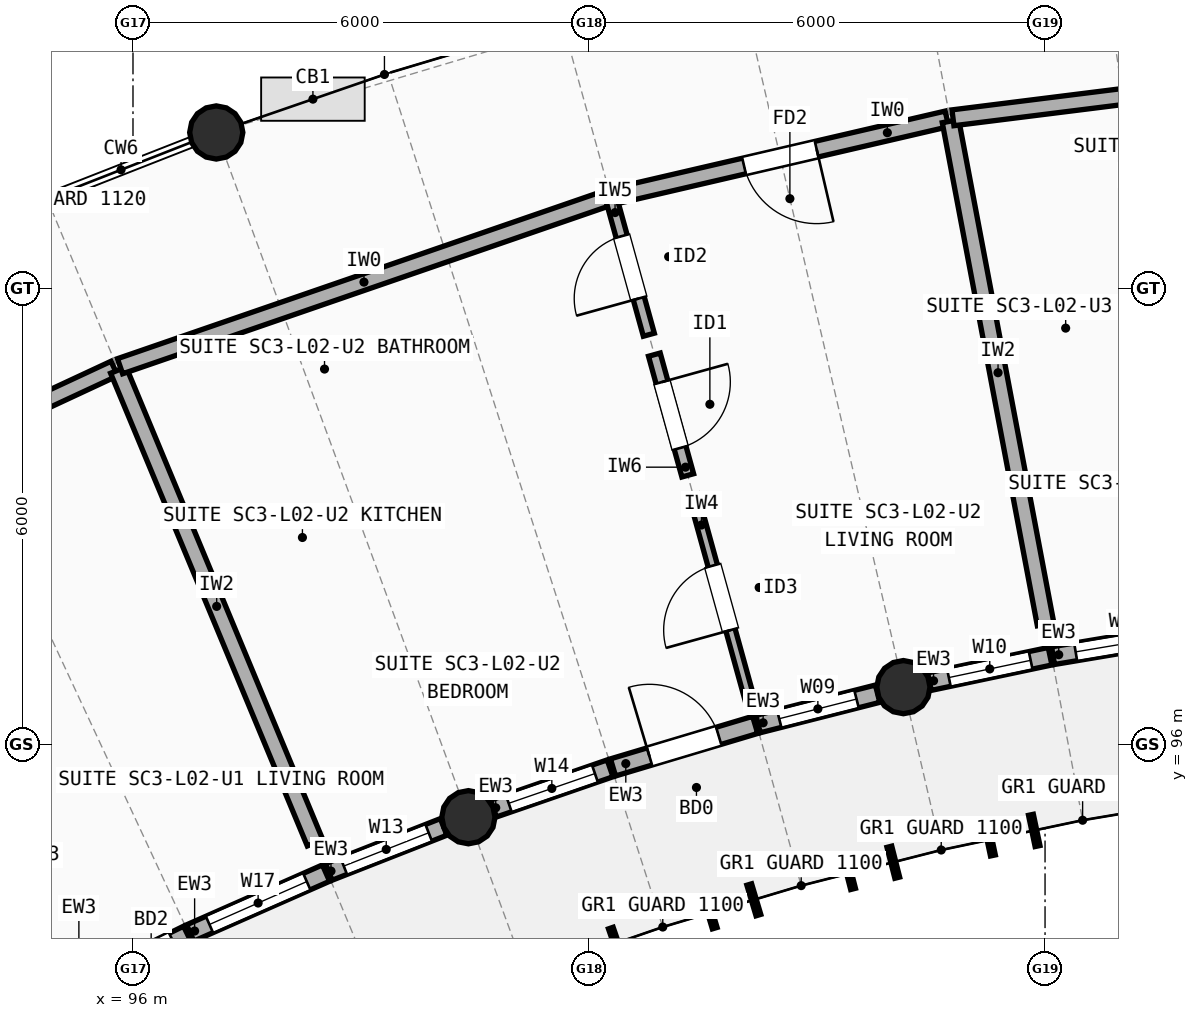
"""IFC4 building model, lengths in metres.
Left out: names, types, materials, properties, quantities, classifications, styles, units other than length and angle.
Written with IfcOpenShell. Run it as: python <this file> out.ifc"""

import sys

from ifc_helpers import new_model, si_unit, direction, frame, frame_2d, origin, origin_2d, place, context, subcontext, project, spatial, rectangle, circle, extrude, element, fill, save


model = new_model("IFC4")
c1 = context("Model", 3, precision=1e-05, world=origin(), true_north=direction((0.0, 1.0)))
c2 = subcontext(c1, "Body", "Model", "MODEL_VIEW")
j1 = project(units=[si_unit("LENGTHUNIT", "METRE"), si_unit("PLANEANGLEUNIT", "RADIAN")], contexts=[c1])
p1 = place(None, origin())
s1 = spatial("IfcSite", under=j1, at=p1, CompositionType="ELEMENT")
p2 = place(p1, origin())
s2 = spatial("IfcBuilding", under=s1, at=p2, CompositionType="ELEMENT")
p3 = place(p2, frame((0.0, 0.0, 7.7)))
s3 = spatial("IfcBuildingStorey", under=s2, at=p3, CompositionType="ELEMENT", Elevation=7.7)
for number, where, z_axis, x_axis in (
    (1, (100.413, 95.043, 0.0), (0.0, 0.0, 1.0), (1.0, 0.0, 0.0)),
    (2, (97.095, 104.052, 0.0), (0.0, 0.0, 1.0), (1.0, 0.0, 0.0)),
    (3, (106.136, 96.754, 0.0), (0.0, 0.0, 1.0), (1.0, 0.0, 0.0)),
):
    element("IfcColumn", number, at=place(p3, frame(where, z_axis=z_axis, x_axis=x_axis)), inside=s3, PredefinedType="COLUMN", context=c2, shape_type="SweptSolid", body=[
        extrude(circle(Radius=0.35, at=origin_2d()), origin(), (0.0, 0.0, 1.0), 2.948),
    ])
p4 = place(p3, frame((95.261, 92.788, 0.0), z_axis=(0.0, 0.0, 1.0), x_axis=(0.897535518759, 0.440942164649, 0.0)))
e4 = element("IfcWall", 4, at=p4, inside=s3, PredefinedType="STANDARD", context=c2, shape_type="SweptSolid", body=[
    extrude(rectangle(XDim=1.622, YDim=0.235, at=frame_2d((0.811, 0.0))), origin(), (0.0, 0.0, 1.0), 2.684),
])
p5 = place(p4, frame((0.211, 0.0, 0.0)))
e5 = element("IfcOpeningElement", 5, at=p5, cuts=e4, PredefinedType="OPENING", context=c2, shape_type="SweptSolid", body=[
    extrude(rectangle(XDim=1.2, YDim=2.15, at=frame_2d((0.6, 1.075))), frame((0.0, 0.127, 0.0), z_axis=(0.0, -1.0, 0.0), x_axis=(1.0, 0.0, 0.0)), (0.0, 0.0, 1.0), 0.255),
])
p6 = place(p3, frame((96.753, 93.521, 0.0), z_axis=(0.0, 0.0, 1.0), x_axis=(0.915126852478, 0.403166025197, 0.0)))
e6 = element("IfcWall", 6, at=p6, inside=s3, PredefinedType="STANDARD", context=c2, shape_type="SweptSolid", body=[
    extrude(rectangle(XDim=1.952, YDim=0.235, at=frame_2d((0.976, 0.0))), origin(), (0.0, 0.0, 1.0), 2.684),
])
p7 = place(p6, frame((0.276, 0.0, 0.85)))
e7 = element("IfcOpeningElement", 7, at=p7, cuts=e6, PredefinedType="OPENING", context=c2, shape_type="SweptSolid", body=[
    extrude(rectangle(XDim=1.4, YDim=1.5, at=frame_2d((0.7, 0.75))), frame((0.0, 0.127, 0.0), z_axis=(0.0, -1.0, 0.0), x_axis=(1.0, 0.0, 0.0)), (0.0, 0.0, 1.0), 0.255),
])
p8 = place(p3, frame((98.577, 94.323, 0.0), z_axis=(0.0, 0.0, 1.0), x_axis=(0.930967180533, 0.365102874228, 0.0)))
e8 = element("IfcWall", 8, at=p8, inside=s3, PredefinedType="STANDARD", context=c2, shape_type="SweptSolid", body=[
    extrude(rectangle(XDim=1.622, YDim=0.235, at=frame_2d((0.811, 0.0))), origin(), (0.0, 0.0, 1.0), 2.684),
])
p9 = place(p8, frame((0.211, 0.0, 0.85)))
e9 = element("IfcOpeningElement", 9, at=p9, cuts=e8, PredefinedType="OPENING", context=c2, shape_type="SweptSolid", body=[
    extrude(rectangle(XDim=1.2, YDim=1.45, at=frame_2d((0.6, 0.725))), frame((0.0, 0.127, 0.0), z_axis=(0.0, -1.0, 0.0), x_axis=(1.0, 0.0, 0.0)), (0.0, 0.0, 1.0), 0.255),
])
p10 = place(p3, frame((100.744, 95.157, 0.0), z_axis=(0.0, 0.0, 1.0), x_axis=(0.945336194352, 0.32609734689, 0.0)))
e10 = element("IfcWall", 10, at=p10, inside=s3, PredefinedType="STANDARD", context=c2, shape_type="SweptSolid", body=[
    extrude(rectangle(XDim=1.622, YDim=0.235, at=frame_2d((0.811, 0.0))), origin(), (0.0, 0.0, 1.0), 2.684),
])
p11 = place(p10, frame((0.211, 0.0, 0.85)))
e11 = element("IfcOpeningElement", 11, at=p11, cuts=e10, PredefinedType="OPENING", context=c2, shape_type="SweptSolid", body=[
    extrude(rectangle(XDim=1.2, YDim=1.5, at=frame_2d((0.6, 0.75))), frame((0.0, 0.127, 0.0), z_axis=(0.0, -1.0, 0.0), x_axis=(1.0, 0.0, 0.0)), (0.0, 0.0, 1.0), 0.255),
])
p12 = place(p3, frame((102.316, 95.698, 0.0), z_axis=(0.0, 0.0, 1.0), x_axis=(0.95807718441, 0.286510224446, 0.0)))
e12 = element("IfcWall", 12, at=p12, inside=s3, PredefinedType="STANDARD", context=c2, shape_type="SweptSolid", body=[
    extrude(rectangle(XDim=1.952, YDim=0.235, at=frame_2d((0.976, 0.0))), origin(), (0.0, 0.0, 1.0), 2.684),
])
p13 = place(p12, frame((0.501, 0.0, 0.0)))
e13 = element("IfcOpeningElement", 13, at=p13, cuts=e12, PredefinedType="OPENING", context=c2, shape_type="SweptSolid", body=[
    extrude(rectangle(XDim=0.95, YDim=2.12, at=frame_2d((0.475, 1.06))), frame((0.0, 0.127, 0.0), z_axis=(0.0, -1.0, 0.0), x_axis=(1.0, 0.0, 0.0)), (0.0, 0.0, 1.0), 0.255),
])
p14 = place(p3, frame((104.225, 96.268, 0.0), z_axis=(0.0, 0.0, 1.0), x_axis=(0.969152085663, 0.246463455413, 0.0)))
e14 = element("IfcWall", 14, at=p14, inside=s3, PredefinedType="STANDARD", context=c2, shape_type="SweptSolid", body=[
    extrude(rectangle(XDim=1.623, YDim=0.235, at=frame_2d((0.811, 0.0))), origin(), (0.0, 0.0, 1.0), 2.684),
])
p15 = place(p14, frame((0.286, 0.0, 0.85)))
e15 = element("IfcOpeningElement", 15, at=p15, cuts=e14, PredefinedType="OPENING", context=c2, shape_type="SweptSolid", body=[
    extrude(rectangle(XDim=1.05, YDim=1.35, at=frame_2d((0.525, 0.675))), frame((0.0, 0.127, 0.0), z_axis=(0.0, -1.0, 0.0), x_axis=(1.0, 0.0, 0.0)), (0.0, 0.0, 1.0), 0.255),
])
p16 = place(p3, frame((106.479, 96.826, 0.0), z_axis=(0.0, 0.0, 1.0), x_axis=(0.978514642092, 0.206177339229, 0.0)))
e16 = element("IfcWall", 16, at=p16, inside=s3, PredefinedType="STANDARD", context=c2, shape_type="SweptSolid", body=[
    extrude(rectangle(XDim=1.622, YDim=0.235, at=frame_2d((0.811, 0.0))), origin(), (0.0, 0.0, 1.0), 2.684),
])
p17 = place(p16, frame((0.261, 0.0, 0.85)))
e17 = element("IfcOpeningElement", 17, at=p17, cuts=e16, PredefinedType="OPENING", context=c2, shape_type="SweptSolid", body=[
    extrude(rectangle(XDim=1.1, YDim=1.45, at=frame_2d((0.55, 0.725))), frame((0.0, 0.127, 0.0), z_axis=(0.0, -1.0, 0.0), x_axis=(1.0, 0.0, 0.0)), (0.0, 0.0, 1.0), 0.255),
])
p18 = place(p3, frame((108.105, 97.168, 0.0), z_axis=(0.0, 0.0, 1.0), x_axis=(0.986241418229, 0.165311418144, 0.0)))
e18 = element("IfcWall", 18, at=p18, inside=s3, PredefinedType="STANDARD", context=c2, shape_type="SweptSolid", body=[
    extrude(rectangle(XDim=1.952, YDim=0.235, at=frame_2d((0.976, 0.0))), origin(), (0.0, 0.0, 1.0), 2.684),
])
p19 = place(p18, frame((0.301, 0.0, 0.85)))
e19 = element("IfcOpeningElement", 19, at=p19, cuts=e18, PredefinedType="OPENING", context=c2, shape_type="SweptSolid", body=[
    extrude(rectangle(XDim=1.35, YDim=1.5, at=frame_2d((0.675, 0.75))), frame((0.0, 0.127, 0.0), z_axis=(0.0, -1.0, 0.0), x_axis=(1.0, 0.0, 0.0)), (0.0, 0.0, 1.0), 0.255),
])
p20 = place(p3, frame((91.675, 99.046, 0.0), z_axis=(0.0, 0.0, 1.0), x_axis=(0.906512639591, 0.422178675755, 0.0)))
e20 = element("IfcWall", 20, at=p20, inside=s3, PredefinedType="SOLIDWALL", context=c2, shape_type="SweptSolid", body=[
    extrude(rectangle(XDim=4.501, YDim=0.21, at=frame_2d((2.251, 0.0))), origin(), (0.0, 0.0, 1.0), 2.762),
])
p21 = place(p20, frame((1.751, 0.0, 0.0)))
e21 = element("IfcOpeningElement", 21, at=p21, cuts=e20, PredefinedType="OPENING", context=c2, shape_type="SweptSolid", body=[
    extrude(rectangle(XDim=1.0, YDim=2.15, at=frame_2d((0.5, 1.075))), frame((0.0, 0.115, 0.0), z_axis=(0.0, -1.0, 0.0), x_axis=(1.0, 0.0, 0.0)), (0.0, 0.0, 1.0), 0.23),
])
p22 = place(p3, frame((98.395, 94.707, 0.0), z_axis=(0.0, 0.0, 1.0), x_axis=(-0.384190705314, 0.923253758157, 0.0)))
e22 = element("IfcWall", 22, at=p22, inside=s3, PredefinedType="SOLIDWALL", context=c2, shape_type="SweptSolid", body=[
    extrude(rectangle(XDim=6.736, YDim=0.22, at=frame_2d((3.368, 0.0))), origin(), (0.0, 0.0, 1.0), 2.722),
])
p23 = place(p3, frame((95.83, 100.976, 0.0), z_axis=(0.0, 0.0, 1.0), x_axis=(0.945371453115, 0.325995115969, 0.0)))
e23 = element("IfcWall", 23, at=p23, inside=s3, PredefinedType="SOLIDWALL", context=c2, shape_type="SweptSolid", body=[
    extrude(rectangle(XDim=6.79, YDim=0.21, at=frame_2d((3.395, 0.0))), origin(), (0.0, 0.0, 1.0), 2.742),
])
p24 = place(p3, frame((102.325, 103.212, 0.0), z_axis=(0.0, 0.0, 1.0), x_axis=(0.974052809246, 0.226320844821, 0.0)))
e24 = element("IfcWall", 24, at=p24, inside=s3, PredefinedType="SOLIDWALL", context=c2, shape_type="SweptSolid", body=[
    extrude(rectangle(XDim=4.501, YDim=0.21, at=frame_2d((2.251, 0.0))), origin(), (0.0, 0.0, 1.0), 2.742),
])
p25 = place(p24, frame((1.761, 0.0, 0.0)))
e25 = element("IfcOpeningElement", 25, at=p25, cuts=e24, PredefinedType="OPENING", context=c2, shape_type="SweptSolid", body=[
    extrude(rectangle(XDim=0.98, YDim=2.15, at=frame_2d((0.49, 1.075))), frame((0.0, 0.115, 0.0), z_axis=(0.0, -1.0, 0.0), x_axis=(1.0, 0.0, 0.0)), (0.0, 0.0, 1.0), 0.23),
])
p26 = place(p3, frame((104.118, 96.58, 0.0), z_axis=(0.0, 0.0, 1.0), x_axis=(-0.266568819947, 0.963815887103, 0.0)))
e26 = element("IfcWall", 26, at=p26, inside=s3, PredefinedType="PARTITIONING", context=c2, shape_type="SweptSolid", body=[
    extrude(rectangle(XDim=2.8, YDim=0.125, at=frame_2d((1.4, 0.0))), origin(), (0.0, 0.0, 1.0), 2.722),
])
p27 = place(p26, frame((0.96, 0.0, 0.0)))
e27 = element("IfcOpeningElement", 27, at=p27, cuts=e26, PredefinedType="OPENING", context=c2, shape_type="SweptSolid", body=[
    extrude(rectangle(XDim=0.88, YDim=2.1, at=frame_2d((0.44, 1.05))), frame((0.0, 0.073, 0.0), z_axis=(0.0, -1.0, 0.0), x_axis=(1.0, 0.0, 0.0)), (0.0, 0.0, 1.0), 0.145),
])
p28 = place(p3, frame((103.299, 99.54, 0.0), z_axis=(0.0, 0.0, 1.0), x_axis=(-0.266512853444, 0.963831364373, 0.0)))
e28 = element("IfcWall", 28, at=p28, inside=s3, PredefinedType="PLUMBINGWALL", context=c2, shape_type="SweptSolid", body=[
    extrude(rectangle(XDim=1.648, YDim=0.16, at=frame_2d((0.824, 0.0))), origin(), (0.0, 0.0, 1.0), 2.722),
])
p29 = place(p28, frame((0.374, 0.0, 0.0)))
e29 = element("IfcOpeningElement", 29, at=p29, cuts=e28, PredefinedType="OPENING", context=c2, shape_type="SweptSolid", body=[
    extrude(rectangle(XDim=0.9, YDim=2.1, at=frame_2d((0.45, 1.05))), frame((0.0, 0.09, 0.0), z_axis=(0.0, -1.0, 0.0), x_axis=(1.0, 0.0, 0.0)), (0.0, 0.0, 1.0), 0.18),
])
p30 = place(p3, frame((102.787, 101.391, 0.0), z_axis=(0.0, 0.0, 1.0), x_axis=(-0.266562452526, 0.963817648159, 0.0)))
e30 = element("IfcWall", 30, at=p30, inside=s3, PredefinedType="PARTITIONING", context=c2, shape_type="SweptSolid", body=[
    extrude(rectangle(XDim=1.84, YDim=0.15, at=frame_2d((0.92, 0.0))), origin(), (0.0, 0.0, 1.0), 2.722),
])
p31 = place(p30, frame((0.495, 0.0, 0.0)))
e31 = element("IfcOpeningElement", 31, at=p31, cuts=e30, PredefinedType="OPENING", context=c2, shape_type="SweptSolid", body=[
    extrude(rectangle(XDim=0.85, YDim=2.1, at=frame_2d((0.425, 1.05))), frame((0.0, 0.085, 0.0), z_axis=(0.0, -1.0, 0.0), x_axis=(1.0, 0.0, 0.0)), (0.0, 0.0, 1.0), 0.17),
])
p32 = place(p3, frame((108.007, 97.582, 0.0), z_axis=(0.0, 0.0, 1.0), x_axis=(-0.185712925624, 0.982604045003, 0.0)))
e32 = element("IfcWall", 32, at=p32, inside=s3, PredefinedType="SOLIDWALL", context=c2, shape_type="SweptSolid", body=[
    extrude(rectangle(XDim=6.736, YDim=0.22, at=frame_2d((3.368, 0.0))), origin(), (0.0, 0.0, 1.0), 2.762),
])
p33 = place(p3, frame((106.788, 104.245, 0.0), z_axis=(0.0, 0.0, 1.0), x_axis=(0.992257394877, 0.124198479504, 0.0)))
e33 = element("IfcWall", 33, at=p33, inside=s3, PredefinedType="SOLIDWALL", context=c2, shape_type="SweptSolid", body=[
    extrude(rectangle(XDim=6.79, YDim=0.21, at=frame_2d((3.395, 0.0))), origin(), (0.0, 0.0, 1.0), 2.722),
])
p34 = place(p7, origin())
e34 = element("IfcWindow", 34, at=p34, inside=s3, PartitioningType="SINGLE_PANEL", PredefinedType="WINDOW", context=c2, shape_type="SweptSolid", body=[
    extrude(rectangle(XDim=1.4, YDim=1.5, at=frame_2d((0.7, 0.75))), frame((0.0, 0.03, 0.0), z_axis=(0.0, -1.0, 0.0), x_axis=(1.0, 0.0, 0.0)), (0.0, 0.0, 1.0), 0.06),
])
fill(e7, e34)
p35 = place(p9, origin())
e35 = element("IfcWindow", 35, at=p35, inside=s3, PartitioningType="SINGLE_PANEL", PredefinedType="WINDOW", context=c2, shape_type="SweptSolid", body=[
    extrude(rectangle(XDim=1.2, YDim=1.45, at=frame_2d((0.6, 0.725))), frame((0.0, 0.03, 0.0), z_axis=(0.0, -1.0, 0.0), x_axis=(1.0, 0.0, 0.0)), (0.0, 0.0, 1.0), 0.06),
])
fill(e9, e35)
p36 = place(p11, origin())
e36 = element("IfcWindow", 36, at=p36, inside=s3, PartitioningType="SINGLE_PANEL", PredefinedType="WINDOW", context=c2, shape_type="SweptSolid", body=[
    extrude(rectangle(XDim=1.2, YDim=1.5, at=frame_2d((0.6, 0.75))), frame((0.0, 0.03, 0.0), z_axis=(0.0, -1.0, 0.0), x_axis=(1.0, 0.0, 0.0)), (0.0, 0.0, 1.0), 0.06),
])
fill(e11, e36)
p37 = place(p13, frame((0.95, 0.0, 0.0), z_axis=(0.0, 0.0, 1.0), x_axis=(-1.0, 0.0, 0.0)))
e37 = element("IfcDoor", 37, at=p37, inside=s3, OperationType="SINGLE_SWING_LEFT", PredefinedType="DOOR", context=c2, shape_type="SweptSolid", body=[
    extrude(rectangle(XDim=0.95, YDim=2.12, at=frame_2d((0.475, 1.06))), frame((0.0, 0.025, 0.0), z_axis=(0.0, -1.0, 0.0), x_axis=(1.0, 0.0, 0.0)), (0.0, 0.0, 1.0), 0.05),
])
fill(e13, e37)
p38 = place(p15, origin())
e38 = element("IfcWindow", 38, at=p38, inside=s3, PartitioningType="SINGLE_PANEL", PredefinedType="WINDOW", context=c2, shape_type="SweptSolid", body=[
    extrude(rectangle(XDim=1.05, YDim=1.35, at=frame_2d((0.525, 0.675))), frame((0.0, 0.03, 0.0), z_axis=(0.0, -1.0, 0.0), x_axis=(1.0, 0.0, 0.0)), (0.0, 0.0, 1.0), 0.06),
])
fill(e15, e38)
p39 = place(p17, origin())
e39 = element("IfcWindow", 39, at=p39, inside=s3, PartitioningType="SINGLE_PANEL", PredefinedType="WINDOW", context=c2, shape_type="SweptSolid", body=[
    extrude(rectangle(XDim=1.1, YDim=1.45, at=frame_2d((0.55, 0.725))), frame((0.0, 0.03, 0.0), z_axis=(0.0, -1.0, 0.0), x_axis=(1.0, 0.0, 0.0)), (0.0, 0.0, 1.0), 0.06),
])
fill(e17, e39)
p40 = place(p19, origin())
e40 = element("IfcWindow", 40, at=p40, inside=s3, PartitioningType="SINGLE_PANEL", PredefinedType="WINDOW", context=c2, shape_type="SweptSolid", body=[
    extrude(rectangle(XDim=1.35, YDim=1.5, at=frame_2d((0.675, 0.75))), frame((0.0, 0.03, 0.0), z_axis=(0.0, -1.0, 0.0), x_axis=(1.0, 0.0, 0.0)), (0.0, 0.0, 1.0), 0.06),
])
fill(e19, e40)
p41 = place(p25, origin())
e41 = element("IfcDoor", 41, at=p41, inside=s3, OperationType="SINGLE_SWING_RIGHT", PredefinedType="DOOR", context=c2, shape_type="SweptSolid", body=[
    extrude(rectangle(XDim=0.98, YDim=2.15, at=frame_2d((0.49, 1.075))), frame((0.0, 0.025, 0.0), z_axis=(0.0, -1.0, 0.0), x_axis=(1.0, 0.0, 0.0)), (0.0, 0.0, 1.0), 0.05),
])
fill(e25, e41)
p42 = place(p27, origin())
e42 = element("IfcDoor", 42, at=p42, inside=s3, OperationType="SINGLE_SWING_LEFT", PredefinedType="DOOR", context=c2, shape_type="SweptSolid", body=[
    extrude(rectangle(XDim=0.88, YDim=2.1, at=frame_2d((0.44, 1.05))), frame((0.0, 0.025, 0.0), z_axis=(0.0, -1.0, 0.0), x_axis=(1.0, 0.0, 0.0)), (0.0, 0.0, 1.0), 0.05),
])
fill(e27, e42)
p43 = place(p29, origin())
e43 = element("IfcDoor", 43, at=p43, inside=s3, OperationType="SINGLE_SWING_RIGHT", PredefinedType="DOOR", context=c2, shape_type="SweptSolid", body=[
    extrude(rectangle(XDim=0.9, YDim=2.1, at=frame_2d((0.45, 1.05))), frame((0.0, 0.025, 0.0), z_axis=(0.0, -1.0, 0.0), x_axis=(1.0, 0.0, 0.0)), (0.0, 0.0, 1.0), 0.05),
])
fill(e29, e43)
p44 = place(p31, origin())
e44 = element("IfcDoor", 44, at=p44, inside=s3, OperationType="SINGLE_SWING_LEFT", PredefinedType="DOOR", context=c2, shape_type="SweptSolid", body=[
    extrude(rectangle(XDim=0.85, YDim=2.1, at=frame_2d((0.425, 1.05))), frame((0.0, 0.025, 0.0), z_axis=(0.0, -1.0, 0.0), x_axis=(1.0, 0.0, 0.0)), (0.0, 0.0, 1.0), 0.05),
])
fill(e31, e44)
save(model, sys.argv[1])
